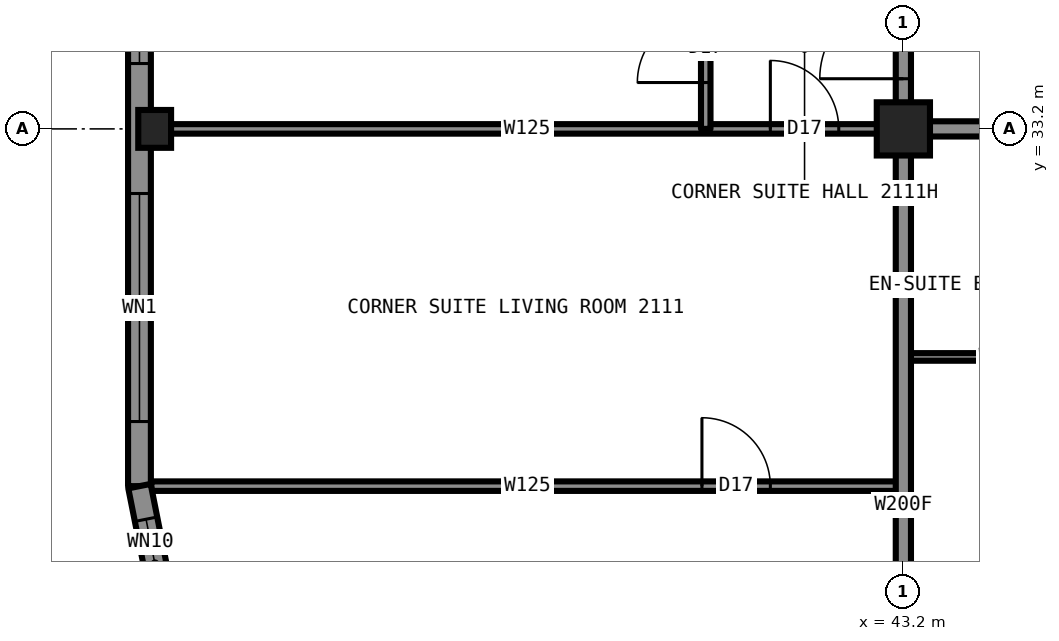
"""IFC4 building model, lengths in metres.
Left out: names, types, materials, properties, quantities, classifications, styles, units other than length and angle.
Written with IfcOpenShell. Run it as: python <this file> out.ifc"""

import sys

from ifc_helpers import new_model, si_unit, direction, frame, frame_2d, origin, origin_2d, place, context, subcontext, project, spatial, rectangle, hollow_rectangle, i_section, extrude, element, fill, save


model = new_model("IFC4")
c1 = context("Model", 3, precision=1e-05, world=origin(), true_north=direction((0.0, 1.0)))
c2 = subcontext(c1, "Body", "Model", "MODEL_VIEW")
j1 = project(units=[si_unit("LENGTHUNIT", "METRE"), si_unit("PLANEANGLEUNIT", "RADIAN")], contexts=[c1])
p1 = place(None, origin())
s1 = spatial("IfcSite", under=j1, at=p1, CompositionType="ELEMENT")
p2 = place(p1, origin())
s2 = spatial("IfcBuilding", under=s1, at=p2, CompositionType="ELEMENT")
p3 = place(p2, frame((0.0, 0.0, 81.0)))
s3 = spatial("IfcBuildingStorey", under=s2, at=p3, CompositionType="ELEMENT", Elevation=81.0)
p4 = place(p3, frame((33.35, 33.2, 0.0), z_axis=(0.0, 0.0, 1.0), x_axis=(1.0, 0.0, 0.0)))
e1 = element("IfcColumn", 1, at=p4, inside=s3, PredefinedType="COLUMN", context=c2, shape_type="SweptSolid", body=[
    extrude(i_section(OverallWidth=0.432, OverallDepth=0.498, WebThickness=0.056, FlangeThickness=0.089, at=origin_2d()), origin(), (0.0, 0.0, 1.0), 3.5),
])
p5 = place(p3, frame((43.2, 33.2, 0.0), z_axis=(0.0, 0.0, 1.0), x_axis=(1.0, 0.0, 0.0)))
e2 = element("IfcColumn", 2, at=p5, inside=s3, PredefinedType="COLUMN", context=c2, shape_type="SweptSolid", body=[
    extrude(hollow_rectangle(XDim=0.7, YDim=0.7, WallThickness=0.06, at=origin_2d()), origin(), (0.0, 0.0, 1.0), 3.5),
])
p6 = place(p3, frame((43.2, 33.2, 0.0), z_axis=(0.0, 0.0, 1.0), x_axis=(1.0, 0.0, 0.0)))
e3 = element("IfcWall", 3, at=p6, inside=s3, PredefinedType="PARTITIONING", context=c2, shape_type="SweptSolid", body=[
    extrude(rectangle(XDim=23.6, YDim=0.2, at=frame_2d((11.8, 0.0))), origin(), (0.0, 0.0, 1.0), 3.33),
])
p7 = place(p6, frame((3.0, 0.0, 0.0)))
e4 = element("IfcOpeningElement", 4, at=p7, cuts=e3, PredefinedType="OPENING", context=c2, shape_type="SweptSolid", body=[
    extrude(rectangle(XDim=1.0, YDim=2.2, at=frame_2d((0.5, 1.1))), frame((0.0, 0.11, 0.0), z_axis=(0.0, -1.0, 0.0), x_axis=(1.0, 0.0, 0.0)), (0.0, 0.0, 1.0), 0.22),
])
p8 = place(p6, frame((11.29, 0.0, 0.0)))
e5 = element("IfcOpeningElement", 5, at=p8, cuts=e3, PredefinedType="OPENING", context=c2, shape_type="SweptSolid", body=[
    extrude(rectangle(XDim=1.1, YDim=2.2, at=frame_2d((0.55, 1.1))), frame((0.0, 0.11, 0.0), z_axis=(0.0, -1.0, 0.0), x_axis=(1.0, 0.0, 0.0)), (0.0, 0.0, 1.0), 0.22),
])
p9 = place(p3, frame((33.3, 33.2, 0.0), z_axis=(0.0, 0.0, 1.0), x_axis=(1.0, 0.0, 0.0)))
e6 = element("IfcWall", 6, at=p9, inside=s3, PredefinedType="PARTITIONING", context=c2, shape_type="SweptSolid", body=[
    extrude(rectangle(XDim=9.9, YDim=0.125, at=frame_2d((4.95, 0.0))), origin(), (0.0, 0.0, 1.0), 2.573),
])
p10 = place(p9, frame((8.15, 0.0, 0.0)))
e7 = element("IfcOpeningElement", 7, at=p10, cuts=e6, PredefinedType="OPENING", context=c2, shape_type="SweptSolid", body=[
    extrude(rectangle(XDim=0.9, YDim=2.2, at=frame_2d((0.45, 1.1))), frame((0.0, 0.073, 0.0), z_axis=(0.0, -1.0, 0.0), x_axis=(1.0, 0.0, 0.0)), (0.0, 0.0, 1.0), 0.145),
])
p11 = place(p3, frame((43.2, 30.2, 0.0), z_axis=(0.0, 0.0, 1.0), x_axis=(1.0, 0.0, 0.0)))
e8 = element("IfcWall", 8, at=p11, inside=s3, PredefinedType="PARTITIONING", context=c2, shape_type="SweptSolid", body=[
    extrude(rectangle(XDim=2.6, YDim=0.1, at=frame_2d((1.3, 0.0))), origin(), (0.0, 0.0, 1.0), 3.33),
])
p12 = place(p3, frame((33.306, 28.5, 0.0), z_axis=(0.0, 0.0, 1.0), x_axis=(1.0, 0.0, 0.0)))
e9 = element("IfcWall", 9, at=p12, inside=s3, PredefinedType="PARTITIONING", context=c2, shape_type="SweptSolid", body=[
    extrude(rectangle(XDim=9.894, YDim=0.125, at=frame_2d((4.947, 0.0))), origin(), (0.0, 0.0, 1.0), 3.33),
])
p13 = place(p12, frame((7.244, 0.0, 0.0)))
e10 = element("IfcOpeningElement", 10, at=p13, cuts=e9, PredefinedType="OPENING", context=c2, shape_type="SweptSolid", body=[
    extrude(rectangle(XDim=0.9, YDim=2.2, at=frame_2d((0.45, 1.1))), frame((0.0, 0.073, 0.0), z_axis=(0.0, -1.0, 0.0), x_axis=(1.0, 0.0, 0.0)), (0.0, 0.0, 1.0), 0.145),
])
p14 = place(p3, frame((43.2, 33.2, 0.0), z_axis=(0.0, 0.0, 1.0), x_axis=(0.0, 1.0, 0.0)))
e11 = element("IfcWall", 11, at=p14, inside=s3, PredefinedType="PARTITIONING", context=c2, shape_type="SweptSolid", body=[
    extrude(rectangle(XDim=4.72, YDim=0.2, at=frame_2d((2.36, 0.0))), origin(), (0.0, 0.0, 1.0), 3.33),
])
p15 = place(p14, frame((0.66, 0.0, 0.0)))
e12 = element("IfcOpeningElement", 12, at=p15, cuts=e11, PredefinedType="OPENING", context=c2, shape_type="SweptSolid", body=[
    extrude(rectangle(XDim=1.1, YDim=2.2, at=frame_2d((0.55, 1.1))), frame((0.0, 0.11, 0.0), z_axis=(0.0, -1.0, 0.0), x_axis=(1.0, 0.0, 0.0)), (0.0, 0.0, 1.0), 0.22),
])
p16 = place(p3, frame((43.2, 23.3, 0.0), z_axis=(0.0, 0.0, 1.0), x_axis=(0.0, 1.0, 0.0)))
e13 = element("IfcWall", 13, at=p16, inside=s3, PredefinedType="PARTITIONING", context=c2, shape_type="SweptSolid", body=[
    extrude(rectangle(XDim=9.9, YDim=0.2, at=frame_2d((4.95, 0.0))), origin(), (0.0, 0.0, 1.0), 2.573),
])
p17 = place(p3, frame((40.6, 33.2, 0.0), z_axis=(0.0, 0.0, 1.0), x_axis=(0.0, 1.0, 0.0)))
e14 = element("IfcWall", 14, at=p17, inside=s3, PredefinedType="PARTITIONING", context=c2, shape_type="SweptSolid", body=[
    extrude(rectangle(XDim=2.12, YDim=0.125, at=frame_2d((1.06, 0.0))), origin(), (0.0, 0.0, 1.0), 3.33),
])
p18 = place(p17, frame((0.61, 0.0, 0.0)))
e15 = element("IfcOpeningElement", 15, at=p18, cuts=e14, PredefinedType="OPENING", context=c2, shape_type="SweptSolid", body=[
    extrude(rectangle(XDim=0.9, YDim=2.2, at=frame_2d((0.45, 1.1))), frame((0.0, 0.073, 0.0), z_axis=(0.0, -1.0, 0.0), x_axis=(1.0, 0.0, 0.0)), (0.0, 0.0, 1.0), 0.145),
])
p19 = place(p3, frame((33.15, 61.5, 0.0), z_axis=(0.0, 0.0, 1.0), x_axis=(0.0, -1.0, 0.0)))
e16 = element("IfcWall", 16, at=p19, inside=s3, PredefinedType="SOLIDWALL", context=c2, shape_type="SweptSolid", body=[
    extrude(rectangle(XDim=33.0, YDim=0.3, at=frame_2d((16.5, 0.0))), origin(), (0.0, 0.0, 1.0), 2.63),
])
p20 = place(p19, frame((0.85, 0.0, 0.5)))
e17 = element("IfcOpeningElement", 17, at=p20, cuts=e16, PredefinedType="OPENING", context=c2, shape_type="SweptSolid", body=[
    extrude(rectangle(XDim=3.0, YDim=2.0, at=frame_2d((1.5, 1.0))), frame((0.0, 0.16, 0.0), z_axis=(0.0, -1.0, 0.0), x_axis=(1.0, 0.0, 0.0)), (0.0, 0.0, 1.0), 0.32),
])
p21 = place(p19, frame((5.56, 0.0, 0.5)))
e18 = element("IfcOpeningElement", 18, at=p21, cuts=e16, PredefinedType="OPENING", context=c2, shape_type="SweptSolid", body=[
    extrude(rectangle(XDim=3.0, YDim=2.0, at=frame_2d((1.5, 1.0))), frame((0.0, 0.16, 0.0), z_axis=(0.0, -1.0, 0.0), x_axis=(1.0, 0.0, 0.0)), (0.0, 0.0, 1.0), 0.32),
])
p22 = place(p19, frame((10.28, 0.0, 0.5)))
e19 = element("IfcOpeningElement", 19, at=p22, cuts=e16, PredefinedType="OPENING", context=c2, shape_type="SweptSolid", body=[
    extrude(rectangle(XDim=3.0, YDim=2.0, at=frame_2d((1.5, 1.0))), frame((0.0, 0.16, 0.0), z_axis=(0.0, -1.0, 0.0), x_axis=(1.0, 0.0, 0.0)), (0.0, 0.0, 1.0), 0.32),
])
p23 = place(p19, frame((15.0, 0.0, 0.5)))
e20 = element("IfcOpeningElement", 20, at=p23, cuts=e16, PredefinedType="OPENING", context=c2, shape_type="SweptSolid", body=[
    extrude(rectangle(XDim=3.0, YDim=2.0, at=frame_2d((1.5, 1.0))), frame((0.0, 0.16, 0.0), z_axis=(0.0, -1.0, 0.0), x_axis=(1.0, 0.0, 0.0)), (0.0, 0.0, 1.0), 0.32),
])
p24 = place(p19, frame((19.72, 0.0, 0.5)))
e21 = element("IfcOpeningElement", 21, at=p24, cuts=e16, PredefinedType="OPENING", context=c2, shape_type="SweptSolid", body=[
    extrude(rectangle(XDim=3.0, YDim=2.0, at=frame_2d((1.5, 1.0))), frame((0.0, 0.16, 0.0), z_axis=(0.0, -1.0, 0.0), x_axis=(1.0, 0.0, 0.0)), (0.0, 0.0, 1.0), 0.32),
])
p25 = place(p19, frame((24.44, 0.0, 0.5)))
e22 = element("IfcOpeningElement", 22, at=p25, cuts=e16, PredefinedType="OPENING", context=c2, shape_type="SweptSolid", body=[
    extrude(rectangle(XDim=3.0, YDim=2.0, at=frame_2d((1.5, 1.0))), frame((0.0, 0.16, 0.0), z_axis=(0.0, -1.0, 0.0), x_axis=(1.0, 0.0, 0.0)), (0.0, 0.0, 1.0), 0.32),
])
p26 = place(p19, frame((29.15, 0.0, 0.5)))
e23 = element("IfcOpeningElement", 23, at=p26, cuts=e16, PredefinedType="OPENING", context=c2, shape_type="SweptSolid", body=[
    extrude(rectangle(XDim=3.0, YDim=2.0, at=frame_2d((1.5, 1.0))), frame((0.0, 0.16, 0.0), z_axis=(0.0, -1.0, 0.0), x_axis=(1.0, 0.0, 0.0)), (0.0, 0.0, 1.0), 0.32),
])
p27 = place(p3, frame((33.15, 28.5, 0.0), z_axis=(0.0, 0.0, 1.0), x_axis=(0.195081421501, -0.980787050784, 0.0)))
e24 = element("IfcWall", 24, at=p27, inside=s3, PredefinedType="SOLIDWALL", context=c2, shape_type="SweptSolid", body=[
    extrude(rectangle(XDim=2.087, YDim=0.3, at=frame_2d((1.044, 0.0))), origin(), (0.0, 0.0, 1.0), 3.33),
])
p28 = place(p27, frame((0.444, 0.0, 1.65)))
e25 = element("IfcOpeningElement", 25, at=p28, cuts=e24, PredefinedType="OPENING", context=c2, shape_type="SweptSolid", body=[
    extrude(rectangle(XDim=0.6, YDim=0.8, at=frame_2d((0.3, 0.4))), frame((0.0, 0.16, 0.0), z_axis=(0.0, -1.0, 0.0), x_axis=(1.0, 0.0, 0.0)), (0.0, 0.0, 1.0), 0.32),
])
p29 = place(p10, origin())
e26 = element("IfcDoor", 26, at=p29, inside=s3, OperationType="SINGLE_SWING_LEFT", PredefinedType="DOOR", context=c2, shape_type="SweptSolid", body=[
    extrude(rectangle(XDim=0.9, YDim=2.2, at=frame_2d((0.45, 1.1))), frame((0.0, 0.025, 0.0), z_axis=(0.0, -1.0, 0.0), x_axis=(1.0, 0.0, 0.0)), (0.0, 0.0, 1.0), 0.05),
])
fill(e7, e26)
p30 = place(p15, origin())
e27 = element("IfcDoor", 27, at=p30, inside=s3, OperationType="SINGLE_SWING_LEFT", PredefinedType="DOOR", context=c2, shape_type="SweptSolid", body=[
    extrude(rectangle(XDim=1.1, YDim=2.2, at=frame_2d((0.55, 1.1))), frame((0.0, 0.025, 0.0), z_axis=(0.0, -1.0, 0.0), x_axis=(1.0, 0.0, 0.0)), (0.0, 0.0, 1.0), 0.05),
])
fill(e12, e27)
p31 = place(p13, origin())
e28 = element("IfcDoor", 28, at=p31, inside=s3, OperationType="SINGLE_SWING_LEFT", PredefinedType="DOOR", context=c2, shape_type="SweptSolid", body=[
    extrude(rectangle(XDim=0.9, YDim=2.2, at=frame_2d((0.45, 1.1))), frame((0.0, 0.025, 0.0), z_axis=(0.0, -1.0, 0.0), x_axis=(1.0, 0.0, 0.0)), (0.0, 0.0, 1.0), 0.05),
])
fill(e10, e28)
p32 = place(p18, origin())
e29 = element("IfcDoor", 29, at=p32, inside=s3, OperationType="SINGLE_SWING_LEFT", PredefinedType="DOOR", context=c2, shape_type="SweptSolid", body=[
    extrude(rectangle(XDim=0.9, YDim=2.2, at=frame_2d((0.45, 1.1))), frame((0.0, 0.025, 0.0), z_axis=(0.0, -1.0, 0.0), x_axis=(1.0, 0.0, 0.0)), (0.0, 0.0, 1.0), 0.05),
])
fill(e15, e29)
p33 = place(p25, origin())
e30 = element("IfcWindow", 30, at=p33, inside=s3, PartitioningType="SINGLE_PANEL", PredefinedType="WINDOW", context=c2, shape_type="SweptSolid", body=[
    extrude(rectangle(XDim=3.0, YDim=2.0, at=frame_2d((1.5, 1.0))), frame((0.0, 0.03, 0.0), z_axis=(0.0, -1.0, 0.0), x_axis=(1.0, 0.0, 0.0)), (0.0, 0.0, 1.0), 0.06),
])
fill(e22, e30)
p34 = place(p26, origin())
e31 = element("IfcWindow", 31, at=p34, inside=s3, PartitioningType="SINGLE_PANEL", PredefinedType="WINDOW", context=c2, shape_type="SweptSolid", body=[
    extrude(rectangle(XDim=3.0, YDim=2.0, at=frame_2d((1.5, 1.0))), frame((0.0, 0.03, 0.0), z_axis=(0.0, -1.0, 0.0), x_axis=(1.0, 0.0, 0.0)), (0.0, 0.0, 1.0), 0.06),
])
fill(e23, e31)
p35 = place(p28, origin())
e32 = element("IfcWindow", 32, at=p35, inside=s3, PartitioningType="SINGLE_PANEL", PredefinedType="WINDOW", context=c2, shape_type="SweptSolid", body=[
    extrude(rectangle(XDim=0.6, YDim=0.8, at=frame_2d((0.3, 0.4))), frame((0.0, 0.03, 0.0), z_axis=(0.0, -1.0, 0.0), x_axis=(1.0, 0.0, 0.0)), (0.0, 0.0, 1.0), 0.06),
])
fill(e25, e32)
save(model, sys.argv[1])
